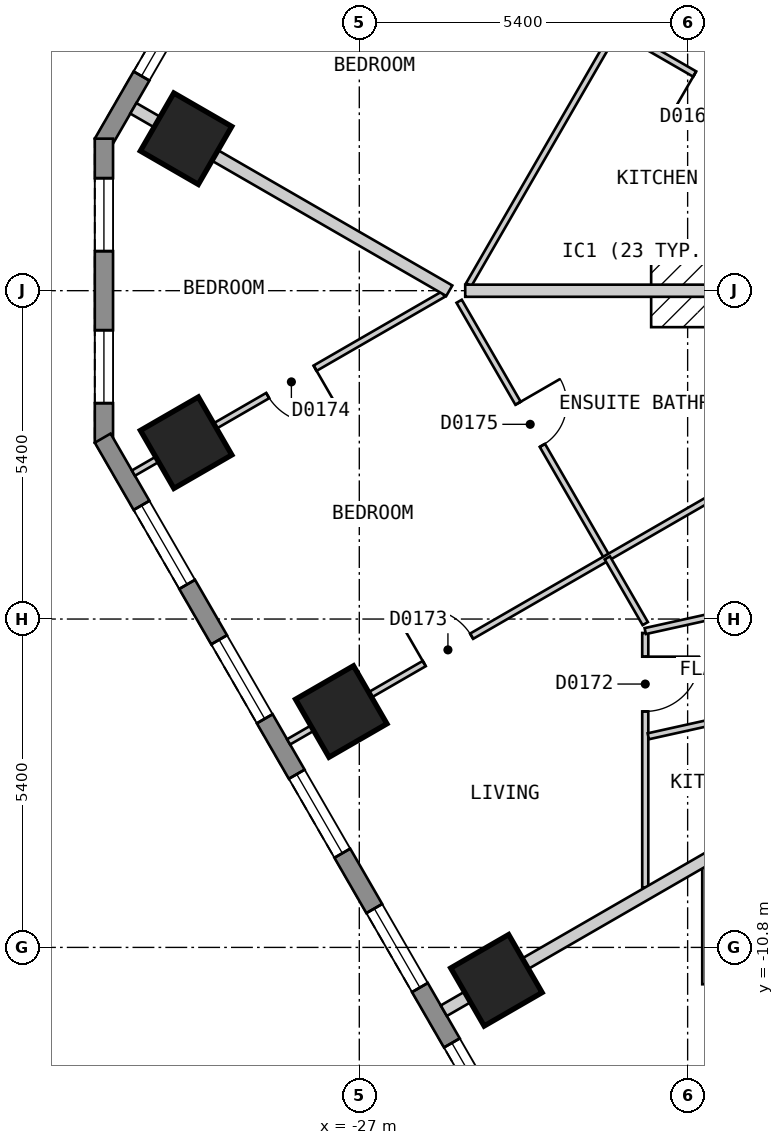
"""IFC4 building model, lengths in metres.
Left out: names, types, materials, properties, quantities, classifications, styles, units other than length and angle.
Written with IfcOpenShell. Run it as: python <this file> out.ifc"""

import sys

from ifc_helpers import new_model, si_unit, direction, frame, frame_2d, origin, origin_2d, place, context, subcontext, project, spatial, polyline, rectangle, outline, extrude, element, fill, save


model = new_model("IFC4")
c1 = context("Model", 3, precision=1e-05, world=origin(), true_north=direction((0.0, 1.0)))
c2 = subcontext(c1, "Body", "Model", "MODEL_VIEW")
j1 = project(units=[si_unit("LENGTHUNIT", "METRE"), si_unit("PLANEANGLEUNIT", "RADIAN")], contexts=[c1])
p1 = place(None, origin())
s1 = spatial("IfcSite", under=j1, at=p1, CompositionType="ELEMENT")
p2 = place(p1, origin())
s2 = spatial("IfcBuilding", under=s1, at=p2, CompositionType="ELEMENT")
p3 = place(p2, frame((0.0, 0.0, 23.4)))
s3 = spatial("IfcBuildingStorey", under=s2, at=p3, CompositionType="ELEMENT", Elevation=23.4)
for number, where, z_axis, x_axis in (
    (1, (-29.849, 2.499, 0.0), (0.0, 0.0, 1.0), (-0.5, -0.866, 0.0)),
    (2, (-29.848, -2.5, 0.0), (0.0, 0.0, 1.0), (0.5, -0.866, 0.0)),
    (3, (-27.297, -6.921, 0.0), (0.0, 0.0, 1.0), (0.5, -0.866, 0.0)),
    (4, (-24.745, -11.341, 0.0), (0.0, 0.0, 1.0), (0.5, -0.866, 0.0)),
):
    element("IfcColumn", number, at=place(p3, frame(where, z_axis=z_axis, x_axis=x_axis)), inside=s3, PredefinedType="COLUMN", context=c2, shape_type="SweptSolid", body=[
        extrude(rectangle(XDim=1.1, YDim=1.1, at=origin_2d()), origin(), (0.0, 0.0, 1.0), 3.0),
    ])
p4 = place(p3, frame((-17.71, 25.825, 0.0), z_axis=(0.0, 0.0, 1.0), x_axis=(-0.500001938803, -0.866024284413, 0.0)))
e5 = element("IfcWall", 5, at=p4, inside=s3, PredefinedType="SOLIDWALL", context=c2, shape_type="SweptSolid", body=[
    extrude(outline(polyline([(0.0, -0.15), (27.02, -0.15), (26.94, 0.15), (0.08, 0.15), (0.0, -0.15)])), origin(), (0.0, 0.0, 1.0), 2.7),
])
p5 = place(p4, frame((1.277, 0.0, 0.15)))
e6 = element("IfcOpeningElement", 6, at=p5, cuts=e5, PredefinedType="OPENING", context=c2, shape_type="SweptSolid", body=[
    extrude(rectangle(XDim=1.5, YDim=2.1, at=frame_2d((0.75, 1.05))), frame((0.0, 0.16, 0.0), z_axis=(0.0, -1.0, 0.0), x_axis=(1.0, 0.0, 0.0)), (0.0, 0.0, 1.0), 0.32),
])
p6 = place(p4, frame((3.829, 0.0, 0.15)))
e7 = element("IfcOpeningElement", 7, at=p6, cuts=e5, PredefinedType="OPENING", context=c2, shape_type="SweptSolid", body=[
    extrude(rectangle(XDim=1.5, YDim=2.1, at=frame_2d((0.75, 1.05))), frame((0.0, 0.16, 0.0), z_axis=(0.0, -1.0, 0.0), x_axis=(1.0, 0.0, 0.0)), (0.0, 0.0, 1.0), 0.32),
])
p7 = place(p4, frame((6.382, 0.0, 0.15)))
e8 = element("IfcOpeningElement", 8, at=p7, cuts=e5, PredefinedType="OPENING", context=c2, shape_type="SweptSolid", body=[
    extrude(rectangle(XDim=1.5, YDim=2.1, at=frame_2d((0.75, 1.05))), frame((0.0, 0.16, 0.0), z_axis=(0.0, -1.0, 0.0), x_axis=(1.0, 0.0, 0.0)), (0.0, 0.0, 1.0), 0.32),
])
p8 = place(p4, frame((8.933, 0.0, 0.15)))
e9 = element("IfcOpeningElement", 9, at=p8, cuts=e5, PredefinedType="OPENING", context=c2, shape_type="SweptSolid", body=[
    extrude(rectangle(XDim=1.5, YDim=2.1, at=frame_2d((0.75, 1.05))), frame((0.0, 0.16, 0.0), z_axis=(0.0, -1.0, 0.0), x_axis=(1.0, 0.0, 0.0)), (0.0, 0.0, 1.0), 0.32),
])
p9 = place(p4, frame((11.485, 0.0, 0.15)))
e10 = element("IfcOpeningElement", 10, at=p9, cuts=e5, PredefinedType="OPENING", context=c2, shape_type="SweptSolid", body=[
    extrude(rectangle(XDim=1.5, YDim=2.1, at=frame_2d((0.75, 1.05))), frame((0.0, 0.16, 0.0), z_axis=(0.0, -1.0, 0.0), x_axis=(1.0, 0.0, 0.0)), (0.0, 0.0, 1.0), 0.32),
])
p10 = place(p4, frame((14.037, 0.0, 0.15)))
e11 = element("IfcOpeningElement", 11, at=p10, cuts=e5, PredefinedType="OPENING", context=c2, shape_type="SweptSolid", body=[
    extrude(rectangle(XDim=1.5, YDim=2.1, at=frame_2d((0.75, 1.05))), frame((0.0, 0.16, 0.0), z_axis=(0.0, -1.0, 0.0), x_axis=(1.0, 0.0, 0.0)), (0.0, 0.0, 1.0), 0.32),
])
p11 = place(p4, frame((16.589, 0.0, 0.15)))
e12 = element("IfcOpeningElement", 12, at=p11, cuts=e5, PredefinedType="OPENING", context=c2, shape_type="SweptSolid", body=[
    extrude(rectangle(XDim=1.5, YDim=2.1, at=frame_2d((0.75, 1.05))), frame((0.0, 0.16, 0.0), z_axis=(0.0, -1.0, 0.0), x_axis=(1.0, 0.0, 0.0)), (0.0, 0.0, 1.0), 0.32),
])
p12 = place(p4, frame((19.141, 0.0, 0.15)))
e13 = element("IfcOpeningElement", 13, at=p12, cuts=e5, PredefinedType="OPENING", context=c2, shape_type="SweptSolid", body=[
    extrude(rectangle(XDim=1.5, YDim=2.1, at=frame_2d((0.75, 1.05))), frame((0.0, 0.16, 0.0), z_axis=(0.0, -1.0, 0.0), x_axis=(1.0, 0.0, 0.0)), (0.0, 0.0, 1.0), 0.32),
])
p13 = place(p4, frame((21.693, 0.0, 0.15)))
e14 = element("IfcOpeningElement", 14, at=p13, cuts=e5, PredefinedType="OPENING", context=c2, shape_type="SweptSolid", body=[
    extrude(rectangle(XDim=1.5, YDim=2.1, at=frame_2d((0.75, 1.05))), frame((0.0, 0.16, 0.0), z_axis=(0.0, -1.0, 0.0), x_axis=(1.0, 0.0, 0.0)), (0.0, 0.0, 1.0), 0.32),
])
p14 = place(p4, frame((24.244, 0.0, 0.15)))
e15 = element("IfcOpeningElement", 15, at=p14, cuts=e5, PredefinedType="OPENING", context=c2, shape_type="SweptSolid", body=[
    extrude(rectangle(XDim=1.5, YDim=2.1, at=frame_2d((0.75, 1.05))), frame((0.0, 0.16, 0.0), z_axis=(0.0, -1.0, 0.0), x_axis=(1.0, 0.0, 0.0)), (0.0, 0.0, 1.0), 0.32),
])
p15 = place(p3, frame((-31.2, 2.5, 0.0), z_axis=(0.0, 0.0, 1.0), x_axis=(0.0, -1.0, 0.0)))
e16 = element("IfcWall", 16, at=p15, inside=s3, PredefinedType="SOLIDWALL", context=c2, shape_type="SweptSolid", body=[
    extrude(outline(polyline([(0.0, -0.15), (5.0, -0.15), (4.92, 0.15), (0.08, 0.15), (0.0, -0.15)])), origin(), (0.0, 0.0, 1.0), 2.7),
])
p16 = place(p15, frame((0.65, 0.0, 0.15)))
e17 = element("IfcOpeningElement", 17, at=p16, cuts=e16, PredefinedType="OPENING", context=c2, shape_type="SweptSolid", body=[
    extrude(rectangle(XDim=1.2, YDim=2.1, at=frame_2d((0.6, 1.05))), frame((0.0, 0.16, 0.0), z_axis=(0.0, -1.0, 0.0), x_axis=(1.0, 0.0, 0.0)), (0.0, 0.0, 1.0), 0.32),
])
p17 = place(p15, frame((3.15, 0.0, 0.15)))
e18 = element("IfcOpeningElement", 18, at=p17, cuts=e16, PredefinedType="OPENING", context=c2, shape_type="SweptSolid", body=[
    extrude(rectangle(XDim=1.2, YDim=2.1, at=frame_2d((0.6, 1.05))), frame((0.0, 0.16, 0.0), z_axis=(0.0, -1.0, 0.0), x_axis=(1.0, 0.0, 0.0)), (0.0, 0.0, 1.0), 0.32),
])
p18 = place(p3, frame((-31.22, -2.425, 0.0), z_axis=(0.0, 0.0, 1.0), x_axis=(0.500001938803, -0.866024284413, 0.0)))
e19 = element("IfcWall", 19, at=p18, inside=s3, PredefinedType="SOLIDWALL", context=c2, shape_type="SweptSolid", body=[
    extrude(outline(polyline([(0.0, -0.15), (27.02, -0.15), (26.94, 0.15), (0.08, 0.15), (0.0, -0.15)])), origin(), (0.0, 0.0, 1.0), 2.7),
])
p19 = place(p18, frame((1.277, 0.0, 0.15)))
e20 = element("IfcOpeningElement", 20, at=p19, cuts=e19, PredefinedType="OPENING", context=c2, shape_type="SweptSolid", body=[
    extrude(rectangle(XDim=1.5, YDim=2.1, at=frame_2d((0.75, 1.05))), frame((0.0, 0.16, 0.0), z_axis=(0.0, -1.0, 0.0), x_axis=(1.0, 0.0, 0.0)), (0.0, 0.0, 1.0), 0.32),
])
p20 = place(p18, frame((3.829, 0.0, 0.15)))
e21 = element("IfcOpeningElement", 21, at=p20, cuts=e19, PredefinedType="OPENING", context=c2, shape_type="SweptSolid", body=[
    extrude(rectangle(XDim=1.5, YDim=2.1, at=frame_2d((0.75, 1.05))), frame((0.0, 0.16, 0.0), z_axis=(0.0, -1.0, 0.0), x_axis=(1.0, 0.0, 0.0)), (0.0, 0.0, 1.0), 0.32),
])
p21 = place(p18, frame((6.382, 0.0, 0.15)))
e22 = element("IfcOpeningElement", 22, at=p21, cuts=e19, PredefinedType="OPENING", context=c2, shape_type="SweptSolid", body=[
    extrude(rectangle(XDim=1.5, YDim=2.1, at=frame_2d((0.75, 1.05))), frame((0.0, 0.16, 0.0), z_axis=(0.0, -1.0, 0.0), x_axis=(1.0, 0.0, 0.0)), (0.0, 0.0, 1.0), 0.32),
])
p22 = place(p18, frame((8.933, 0.0, 0.15)))
e23 = element("IfcOpeningElement", 23, at=p22, cuts=e19, PredefinedType="OPENING", context=c2, shape_type="SweptSolid", body=[
    extrude(rectangle(XDim=1.5, YDim=2.1, at=frame_2d((0.75, 1.05))), frame((0.0, 0.16, 0.0), z_axis=(0.0, -1.0, 0.0), x_axis=(1.0, 0.0, 0.0)), (0.0, 0.0, 1.0), 0.32),
])
p23 = place(p18, frame((11.485, 0.0, 0.15)))
e24 = element("IfcOpeningElement", 24, at=p23, cuts=e19, PredefinedType="OPENING", context=c2, shape_type="SweptSolid", body=[
    extrude(rectangle(XDim=1.5, YDim=2.1, at=frame_2d((0.75, 1.05))), frame((0.0, 0.16, 0.0), z_axis=(0.0, -1.0, 0.0), x_axis=(1.0, 0.0, 0.0)), (0.0, 0.0, 1.0), 0.32),
])
p24 = place(p18, frame((14.037, 0.0, 0.15)))
e25 = element("IfcOpeningElement", 25, at=p24, cuts=e19, PredefinedType="OPENING", context=c2, shape_type="SweptSolid", body=[
    extrude(rectangle(XDim=1.5, YDim=2.1, at=frame_2d((0.75, 1.05))), frame((0.0, 0.16, 0.0), z_axis=(0.0, -1.0, 0.0), x_axis=(1.0, 0.0, 0.0)), (0.0, 0.0, 1.0), 0.32),
])
p25 = place(p18, frame((16.589, 0.0, 0.15)))
e26 = element("IfcOpeningElement", 26, at=p25, cuts=e19, PredefinedType="OPENING", context=c2, shape_type="SweptSolid", body=[
    extrude(rectangle(XDim=1.5, YDim=2.1, at=frame_2d((0.75, 1.05))), frame((0.0, 0.16, 0.0), z_axis=(0.0, -1.0, 0.0), x_axis=(1.0, 0.0, 0.0)), (0.0, 0.0, 1.0), 0.32),
])
p26 = place(p18, frame((19.141, 0.0, 0.15)))
e27 = element("IfcOpeningElement", 27, at=p26, cuts=e19, PredefinedType="OPENING", context=c2, shape_type="SweptSolid", body=[
    extrude(rectangle(XDim=1.5, YDim=2.1, at=frame_2d((0.75, 1.05))), frame((0.0, 0.16, 0.0), z_axis=(0.0, -1.0, 0.0), x_axis=(1.0, 0.0, 0.0)), (0.0, 0.0, 1.0), 0.32),
])
p27 = place(p18, frame((21.693, 0.0, 0.15)))
e28 = element("IfcOpeningElement", 28, at=p27, cuts=e19, PredefinedType="OPENING", context=c2, shape_type="SweptSolid", body=[
    extrude(rectangle(XDim=1.5, YDim=2.1, at=frame_2d((0.75, 1.05))), frame((0.0, 0.16, 0.0), z_axis=(0.0, -1.0, 0.0), x_axis=(1.0, 0.0, 0.0)), (0.0, 0.0, 1.0), 0.32),
])
p28 = place(p18, frame((24.244, 0.0, 0.15)))
e29 = element("IfcOpeningElement", 29, at=p28, cuts=e19, PredefinedType="OPENING", context=c2, shape_type="SweptSolid", body=[
    extrude(rectangle(XDim=1.5, YDim=2.1, at=frame_2d((0.75, 1.05))), frame((0.0, 0.16, 0.0), z_axis=(0.0, -1.0, 0.0), x_axis=(1.0, 0.0, 0.0)), (0.0, 0.0, 1.0), 0.32),
])
p29 = place(p3, frame((-25.358, -0.174, 0.0), z_axis=(0.0, 0.0, 1.0), x_axis=(0.500093956194, -0.865971151354, 0.0)))
e30 = element("IfcWall", 30, at=p29, inside=s3, PredefinedType="PARTITIONING", context=c2, shape_type="SweptSolid", body=[
    extrude(rectangle(XDim=4.873, YDim=0.1, at=frame_2d((2.437, 0.0))), origin(), (0.0, 0.0, 1.0), 2.7),
])
p30 = place(p29, frame((1.937, 0.0, 0.0)))
e31 = element("IfcOpeningElement", 31, at=p30, cuts=e30, PredefinedType="OPENING", context=c2, shape_type="SweptSolid", body=[
    extrude(rectangle(XDim=0.8, YDim=2.1, at=frame_2d((0.4, 1.05))), frame((0.0, 0.06, 0.0), z_axis=(0.0, -1.0, 0.0), x_axis=(1.0, 0.0, 0.0)), (0.0, 0.0, 1.0), 0.12),
])
p31 = place(p3, frame((-21.31, -9.474, 0.0), z_axis=(0.0, 0.0, 1.0), x_axis=(0.0, -1.0, 0.0)))
e32 = element("IfcWall", 32, at=p31, inside=s3, PredefinedType="PARTITIONING", context=c2, shape_type="SweptSolid", body=[
    extrude(rectangle(XDim=1.932, YDim=0.1, at=frame_2d((0.966, 0.0))), origin(), (0.0, 0.0, 1.0), 2.7),
])
p32 = place(p3, frame((-25.2, 0.099, 0.0), z_axis=(0.0, 0.0, 1.0), x_axis=(0.49997477318, 0.866039968006, 0.0)))
e33 = element("IfcWall", 33, at=p32, inside=s3, PredefinedType="PARTITIONING", context=c2, shape_type="SweptSolid", body=[
    extrude(rectangle(XDim=14.965, YDim=0.1, at=frame_2d((7.482, 0.0))), origin(), (0.0, 0.0, 1.0), 2.7),
])
p33 = place(p32, frame((6.96, 0.0, 0.0)))
e34 = element("IfcOpeningElement", 34, at=p33, cuts=e33, PredefinedType="OPENING", context=c2, shape_type="SweptSolid", body=[
    extrude(rectangle(XDim=0.9, YDim=2.1, at=frame_2d((0.45, 1.05))), frame((0.0, 0.06, 0.0), z_axis=(0.0, -1.0, 0.0), x_axis=(1.0, 0.0, 0.0)), (0.0, 0.0, 1.0), 0.12),
])
p34 = place(p3, frame((-22.297, -9.813, 0.0), z_axis=(0.0, 0.0, 1.0), x_axis=(0.0, 1.0, 0.0)))
e35 = element("IfcWall", 35, at=p34, inside=s3, PredefinedType="PARTITIONING", context=c2, shape_type="SweptSolid", body=[
    extrude(rectangle(XDim=4.184, YDim=0.1, at=frame_2d((2.092, 0.0))), origin(), (0.0, 0.0, 1.0), 2.7),
])
p35 = place(p34, frame((2.894, 0.0, 0.0)))
e36 = element("IfcOpeningElement", 36, at=p35, cuts=e35, PredefinedType="OPENING", context=c2, shape_type="SweptSolid", body=[
    extrude(rectangle(XDim=0.9, YDim=2.1, at=frame_2d((0.45, 1.05))), frame((0.0, 0.06, 0.0), z_axis=(0.0, -1.0, 0.0), x_axis=(1.0, 0.0, 0.0)), (0.0, 0.0, 1.0), 0.12),
])
p36 = place(p3, frame((-22.297, -5.598, 0.0), z_axis=(0.0, 0.0, 1.0), x_axis=(0.976341239907, 0.216235481033, 0.0)))
e37 = element("IfcWall", 37, at=p36, inside=s3, PredefinedType="PARTITIONING", context=c2, shape_type="SweptSolid", body=[
    extrude(rectangle(XDim=4.203, YDim=0.1, at=frame_2d((2.102, 0.0))), origin(), (0.0, 0.0, 1.0), 2.7),
])
p37 = place(p36, frame((1.754, 0.0, 0.0)))
e38 = element("IfcOpeningElement", 38, at=p37, cuts=e37, PredefinedType="OPENING", context=c2, shape_type="SweptSolid", body=[
    extrude(rectangle(XDim=0.8, YDim=2.1, at=frame_2d((0.4, 1.05))), frame((0.0, 0.06, 0.0), z_axis=(0.0, -1.0, 0.0), x_axis=(1.0, 0.0, 0.0)), (0.0, 0.0, 1.0), 0.12),
])
p38 = place(p3, frame((-22.247, -7.328, 0.0), z_axis=(0.0, 0.0, 1.0), x_axis=(0.976310522972, 0.216374126765, 0.0)))
e39 = element("IfcWall", 39, at=p38, inside=s3, PredefinedType="PARTITIONING", context=c2, shape_type="SweptSolid", body=[
    extrude(rectangle(XDim=5.065, YDim=0.1, at=frame_2d((2.532, 0.0))), origin(), (0.0, 0.0, 1.0), 2.7),
])
p39 = place(p38, frame((2.109, 0.0, 0.0)))
e40 = element("IfcOpeningElement", 40, at=p39, cuts=e39, PredefinedType="OPENING", context=c2, shape_type="SweptSolid", body=[
    extrude(rectangle(XDim=0.9, YDim=2.1, at=frame_2d((0.45, 1.05))), frame((0.0, 0.06, 0.0), z_axis=(0.0, -1.0, 0.0), x_axis=(1.0, 0.0, 0.0)), (0.0, 0.0, 1.0), 0.12),
])
p40 = place(p3, frame((-28.163, -7.42, 0.0), z_axis=(0.0, 0.0, 1.0), x_axis=(0.866065245018, 0.499930986609, 0.0)))
e41 = element("IfcWall", 41, at=p40, inside=s3, PredefinedType="PARTITIONING", context=c2, shape_type="SweptSolid", body=[
    extrude(rectangle(XDim=10.0, YDim=0.1, at=frame_2d((5.0, 0.0))), origin(), (0.0, 0.0, 1.0), 2.7),
])
p41 = place(p40, frame((2.576, 0.0, 0.0)))
e42 = element("IfcOpeningElement", 42, at=p41, cuts=e41, PredefinedType="OPENING", context=c2, shape_type="SweptSolid", body=[
    extrude(rectangle(XDim=0.9, YDim=2.1, at=frame_2d((0.45, 1.05))), frame((0.0, 0.06, 0.0), z_axis=(0.0, -1.0, 0.0), x_axis=(1.0, 0.0, 0.0)), (0.0, 0.0, 1.0), 0.12),
])
p42 = place(p3, frame((-30.715, -3.0, 0.0), z_axis=(0.0, 0.0, 1.0), x_axis=(0.866054318203, 0.499949915414, 0.0)))
e43 = element("IfcWall", 43, at=p42, inside=s3, PredefinedType="PARTITIONING", context=c2, shape_type="SweptSolid", body=[
    extrude(rectangle(XDim=5.884, YDim=0.1, at=frame_2d((2.942, 0.0))), origin(), (0.0, 0.0, 1.0), 2.7),
])
p43 = place(p42, frame((2.55, 0.0, 0.0)))
e44 = element("IfcOpeningElement", 44, at=p43, cuts=e43, PredefinedType="OPENING", context=c2, shape_type="SweptSolid", body=[
    extrude(rectangle(XDim=0.9, YDim=2.1, at=frame_2d((0.45, 1.05))), frame((0.0, 0.06, 0.0), z_axis=(0.0, -1.0, 0.0), x_axis=(1.0, 0.0, 0.0)), (0.0, 0.0, 1.0), 0.12),
])
p44 = place(p3, frame((-30.716, 2.999, 0.0), z_axis=(0.0, 0.0, 1.0), x_axis=(0.866020924479, -0.500007758305, 0.0)))
e45 = element("IfcWall", 45, at=p44, inside=s3, PredefinedType="PARTITIONING", context=c2, shape_type="SweptSolid", body=[
    extrude(rectangle(XDim=6.0, YDim=0.2, at=frame_2d((3.0, 0.0))), origin(), (0.0, 0.0, 1.0), 2.7),
])
p45 = place(p3, frame((-25.258, -0.001, 0.0), z_axis=(0.0, 0.0, 1.0), x_axis=(1.0, 0.0, 0.0)))
e46 = element("IfcWall", 46, at=p45, inside=s3, PredefinedType="PARTITIONING", context=c2, shape_type="SweptSolid", body=[
    extrude(rectangle(XDim=4.474, YDim=0.2, at=frame_2d((2.237, 0.0))), origin(), (0.0, 0.0, 1.0), 2.7),
])
p46 = place(p3, frame((-25.61, -11.841, 0.0), z_axis=(0.0, 0.0, 1.0), x_axis=(0.866019023803, 0.500011050288, 0.0)))
e47 = element("IfcWall", 47, at=p46, inside=s3, PredefinedType="PARTITIONING", context=c2, shape_type="SweptSolid", body=[
    extrude(rectangle(XDim=8.47, YDim=0.2, at=frame_2d((4.235, 0.0))), origin(), (0.0, 0.0, 1.0), 2.7),
])
p47 = place(p3, frame((-22.921, -4.394, 0.0), z_axis=(0.0, 0.0, 1.0), x_axis=(0.49977889874, -0.86615301903, 0.0)))
e48 = element("IfcWall", 48, at=p47, inside=s3, PredefinedType="PARTITIONING", context=c2, shape_type="SweptSolid", body=[
    extrude(rectangle(XDim=1.248, YDim=0.1, at=frame_2d((0.624, 0.0))), origin(), (0.0, 0.0, 1.0), 2.7),
])
p48 = place(p3, frame((-22.771, 4.306, 0.0), z_axis=(0.0, 0.0, 1.0), x_axis=(0.866008894869, -0.50002859319, 0.0)))
e49 = element("IfcWall", 49, at=p48, inside=s3, PredefinedType="PARTITIONING", context=c2, shape_type="SweptSolid", body=[
    extrude(rectangle(XDim=3.774, YDim=0.1, at=frame_2d((1.887, 0.0))), origin(), (0.0, 0.0, 1.0), 2.7),
])
p49 = place(p48, frame((1.486, 0.0, 0.0)))
e50 = element("IfcOpeningElement", 50, at=p49, cuts=e49, PredefinedType="OPENING", context=c2, shape_type="SweptSolid", body=[
    extrude(rectangle(XDim=0.9, YDim=2.1, at=frame_2d((0.45, 1.05))), frame((0.0, 0.06, 0.0), z_axis=(0.0, -1.0, 0.0), x_axis=(1.0, 0.0, 0.0)), (0.0, 0.0, 1.0), 0.12),
])
p50 = place(p14, origin())
e51 = element("IfcWindow", 51, at=p50, inside=s3, PartitioningType="SINGLE_PANEL", PredefinedType="WINDOW", context=c2, shape_type="SweptSolid", body=[
    extrude(rectangle(XDim=1.5, YDim=2.1, at=frame_2d((0.75, 1.05))), frame((0.0, 0.03, 0.0), z_axis=(0.0, -1.0, 0.0), x_axis=(1.0, 0.0, 0.0)), (0.0, 0.0, 1.0), 0.06),
])
fill(e15, e51)
p51 = place(p16, origin())
e52 = element("IfcWindow", 52, at=p51, inside=s3, PartitioningType="SINGLE_PANEL", PredefinedType="WINDOW", context=c2, shape_type="SweptSolid", body=[
    extrude(rectangle(XDim=1.2, YDim=2.1, at=frame_2d((0.6, 1.05))), frame((0.0, 0.03, 0.0), z_axis=(0.0, -1.0, 0.0), x_axis=(1.0, 0.0, 0.0)), (0.0, 0.0, 1.0), 0.06),
])
fill(e17, e52)
p52 = place(p17, origin())
e53 = element("IfcWindow", 53, at=p52, inside=s3, PartitioningType="SINGLE_PANEL", PredefinedType="WINDOW", context=c2, shape_type="SweptSolid", body=[
    extrude(rectangle(XDim=1.2, YDim=2.1, at=frame_2d((0.6, 1.05))), frame((0.0, 0.03, 0.0), z_axis=(0.0, -1.0, 0.0), x_axis=(1.0, 0.0, 0.0)), (0.0, 0.0, 1.0), 0.06),
])
fill(e18, e53)
p53 = place(p19, origin())
e54 = element("IfcWindow", 54, at=p53, inside=s3, PartitioningType="SINGLE_PANEL", PredefinedType="WINDOW", context=c2, shape_type="SweptSolid", body=[
    extrude(rectangle(XDim=1.5, YDim=2.1, at=frame_2d((0.75, 1.05))), frame((0.0, 0.03, 0.0), z_axis=(0.0, -1.0, 0.0), x_axis=(1.0, 0.0, 0.0)), (0.0, 0.0, 1.0), 0.06),
])
fill(e20, e54)
p54 = place(p20, origin())
e55 = element("IfcWindow", 55, at=p54, inside=s3, PartitioningType="SINGLE_PANEL", PredefinedType="WINDOW", context=c2, shape_type="SweptSolid", body=[
    extrude(rectangle(XDim=1.5, YDim=2.1, at=frame_2d((0.75, 1.05))), frame((0.0, 0.03, 0.0), z_axis=(0.0, -1.0, 0.0), x_axis=(1.0, 0.0, 0.0)), (0.0, 0.0, 1.0), 0.06),
])
fill(e21, e55)
p55 = place(p21, origin())
e56 = element("IfcWindow", 56, at=p55, inside=s3, PartitioningType="SINGLE_PANEL", PredefinedType="WINDOW", context=c2, shape_type="SweptSolid", body=[
    extrude(rectangle(XDim=1.5, YDim=2.1, at=frame_2d((0.75, 1.05))), frame((0.0, 0.03, 0.0), z_axis=(0.0, -1.0, 0.0), x_axis=(1.0, 0.0, 0.0)), (0.0, 0.0, 1.0), 0.06),
])
fill(e22, e56)
p56 = place(p22, origin())
e57 = element("IfcWindow", 57, at=p56, inside=s3, PartitioningType="SINGLE_PANEL", PredefinedType="WINDOW", context=c2, shape_type="SweptSolid", body=[
    extrude(rectangle(XDim=1.5, YDim=2.1, at=frame_2d((0.75, 1.05))), frame((0.0, 0.03, 0.0), z_axis=(0.0, -1.0, 0.0), x_axis=(1.0, 0.0, 0.0)), (0.0, 0.0, 1.0), 0.06),
])
fill(e23, e57)
p57 = place(p23, origin())
e58 = element("IfcWindow", 58, at=p57, inside=s3, PartitioningType="SINGLE_PANEL", PredefinedType="WINDOW", context=c2, shape_type="SweptSolid", body=[
    extrude(rectangle(XDim=1.5, YDim=2.1, at=frame_2d((0.75, 1.05))), frame((0.0, 0.03, 0.0), z_axis=(0.0, -1.0, 0.0), x_axis=(1.0, 0.0, 0.0)), (0.0, 0.0, 1.0), 0.06),
])
fill(e24, e58)
p58 = place(p49, origin())
e59 = element("IfcDoor", 59, at=p58, inside=s3, OperationType="SINGLE_SWING_LEFT", PredefinedType="DOOR", context=c2, shape_type="SweptSolid", body=[
    extrude(rectangle(XDim=0.9, YDim=2.1, at=frame_2d((0.45, 1.05))), frame((0.0, 0.025, 0.0), z_axis=(0.0, -1.0, 0.0), x_axis=(1.0, 0.0, 0.0)), (0.0, 0.0, 1.0), 0.05),
])
fill(e50, e59)
p59 = place(p35, origin())
e60 = element("IfcDoor", 60, at=p59, inside=s3, OperationType="SINGLE_SWING_RIGHT", PredefinedType="DOOR", context=c2, shape_type="SweptSolid", body=[
    extrude(rectangle(XDim=0.9, YDim=2.1, at=frame_2d((0.45, 1.05))), frame((0.0, 0.025, 0.0), z_axis=(0.0, -1.0, 0.0), x_axis=(1.0, 0.0, 0.0)), (0.0, 0.0, 1.0), 0.05),
])
fill(e36, e60)
p60 = place(p41, origin())
e61 = element("IfcDoor", 61, at=p60, inside=s3, OperationType="SINGLE_SWING_LEFT", PredefinedType="DOOR", context=c2, shape_type="SweptSolid", body=[
    extrude(rectangle(XDim=0.9, YDim=2.1, at=frame_2d((0.45, 1.05))), frame((0.0, 0.025, 0.0), z_axis=(0.0, -1.0, 0.0), x_axis=(1.0, 0.0, 0.0)), (0.0, 0.0, 1.0), 0.05),
])
fill(e42, e61)
p61 = place(p43, origin())
e62 = element("IfcDoor", 62, at=p61, inside=s3, OperationType="SINGLE_SWING_RIGHT", PredefinedType="DOOR", context=c2, shape_type="SweptSolid", body=[
    extrude(rectangle(XDim=0.9, YDim=2.1, at=frame_2d((0.45, 1.05))), frame((0.0, 0.025, 0.0), z_axis=(0.0, -1.0, 0.0), x_axis=(1.0, 0.0, 0.0)), (0.0, 0.0, 1.0), 0.05),
])
fill(e44, e62)
p62 = place(p30, origin())
e63 = element("IfcDoor", 63, at=p62, inside=s3, OperationType="SINGLE_SWING_LEFT", PredefinedType="DOOR", context=c2, shape_type="SweptSolid", body=[
    extrude(rectangle(XDim=0.8, YDim=2.1, at=frame_2d((0.4, 1.05))), frame((0.0, 0.025, 0.0), z_axis=(0.0, -1.0, 0.0), x_axis=(1.0, 0.0, 0.0)), (0.0, 0.0, 1.0), 0.05),
])
fill(e31, e63)
save(model, sys.argv[1])
